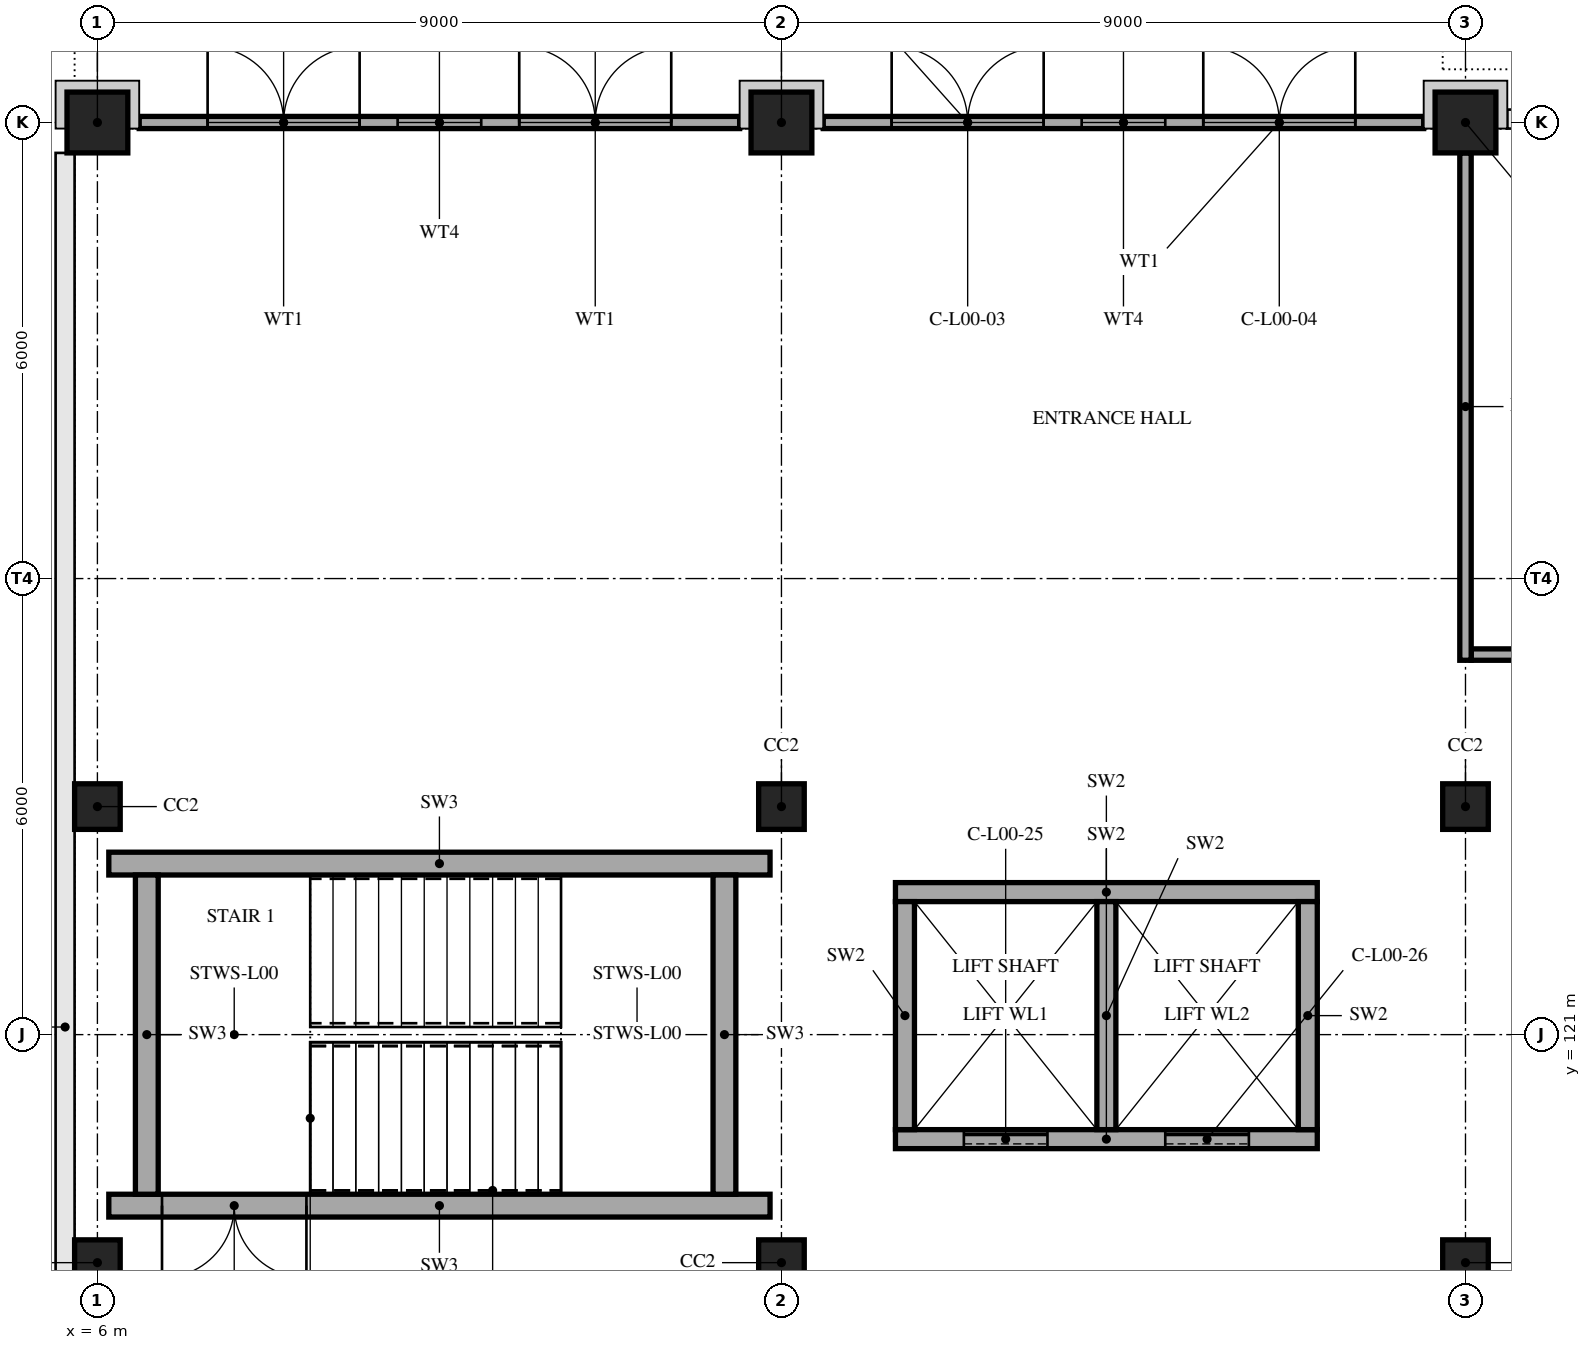
"""IFC4 building model, lengths in metres.
Left out: names, types, materials, properties, quantities, classifications, styles, units other than length and angle.
Written with IfcOpenShell. Run it as: python <this file> out.ifc"""

import sys

from ifc_helpers import new_model, si_unit, direction, frame, frame_2d, origin, origin_2d, place, context, subcontext, project, spatial, rectangle, extrude, element, fill, save


model = new_model("IFC4")
c1 = context("Model", 3, precision=1e-05, world=origin(), true_north=direction((0.0, 1.0)))
c2 = subcontext(c1, "Body", "Model", "MODEL_VIEW")
j1 = project(units=[si_unit("LENGTHUNIT", "METRE"), si_unit("PLANEANGLEUNIT", "RADIAN")], contexts=[c1])
p1 = place(None, origin())
s1 = spatial("IfcSite", under=j1, at=p1, CompositionType="ELEMENT")
p2 = place(p1, origin())
s2 = spatial("IfcBuilding", under=s1, at=p2, CompositionType="ELEMENT")
p3 = place(p2, origin())
s3 = spatial("IfcBuildingStorey", under=s2, at=p3, CompositionType="ELEMENT", Elevation=0.0)
for number, where, z_axis, x_axis in (
    (1, (6.0, 118.0, 0.0), (0.0, 0.0, 1.0), (1.0, 0.0, 0.0)),
    (2, (6.0, 124.0, 0.0), (0.0, 0.0, 1.0), (1.0, 0.0, 0.0)),
):
    element("IfcColumn", number, at=place(p3, frame(where, z_axis=z_axis, x_axis=x_axis)), inside=s3, PredefinedType="COLUMN", context=c2, shape_type="SweptSolid", body=[
        extrude(rectangle(XDim=0.6, YDim=0.6, at=origin_2d()), origin(), (0.0, 0.0, 1.0), 5.0),
    ])
p4 = place(p3, frame((6.0, 133.0, 0.0), z_axis=(0.0, 0.0, 1.0), x_axis=(1.0, 0.0, 0.0)))
e3 = element("IfcColumn", 3, at=p4, inside=s3, PredefinedType="COLUMN", context=c2, shape_type="SweptSolid", body=[
    extrude(rectangle(XDim=0.8, YDim=0.8, at=origin_2d()), origin(), (0.0, 0.0, 1.0), 5.0),
])
for number, where, z_axis, x_axis in (
    (4, (15.0, 118.0, 0.0), (0.0, 0.0, 1.0), (1.0, 0.0, 0.0)),
    (5, (15.0, 124.0, 0.0), (0.0, 0.0, 1.0), (1.0, 0.0, 0.0)),
):
    element("IfcColumn", number, at=place(p3, frame(where, z_axis=z_axis, x_axis=x_axis)), inside=s3, PredefinedType="COLUMN", context=c2, shape_type="SweptSolid", body=[
        extrude(rectangle(XDim=0.6, YDim=0.6, at=origin_2d()), origin(), (0.0, 0.0, 1.0), 5.0),
    ])
p5 = place(p3, frame((15.0, 133.0, 0.0), z_axis=(0.0, 0.0, 1.0), x_axis=(1.0, 0.0, 0.0)))
e6 = element("IfcColumn", 6, at=p5, inside=s3, PredefinedType="COLUMN", context=c2, shape_type="SweptSolid", body=[
    extrude(rectangle(XDim=0.8, YDim=0.8, at=origin_2d()), origin(), (0.0, 0.0, 1.0), 5.0),
])
for number, where, z_axis, x_axis in (
    (7, (24.0, 118.0, 0.0), (0.0, 0.0, 1.0), (1.0, 0.0, 0.0)),
    (8, (24.0, 124.0, 0.0), (0.0, 0.0, 1.0), (1.0, 0.0, 0.0)),
):
    element("IfcColumn", number, at=place(p3, frame(where, z_axis=z_axis, x_axis=x_axis)), inside=s3, PredefinedType="COLUMN", context=c2, shape_type="SweptSolid", body=[
        extrude(rectangle(XDim=0.6, YDim=0.6, at=origin_2d()), origin(), (0.0, 0.0, 1.0), 5.0),
    ])
p6 = place(p3, frame((24.0, 133.0, 0.0), z_axis=(0.0, 0.0, 1.0), x_axis=(1.0, 0.0, 0.0)))
e9 = element("IfcColumn", 9, at=p6, inside=s3, PredefinedType="COLUMN", context=c2, shape_type="SweptSolid", body=[
    extrude(rectangle(XDim=0.8, YDim=0.8, at=origin_2d()), origin(), (0.0, 0.0, 1.0), 5.0),
])
p7 = place(p3, frame((6.15, 118.75, 0.0), z_axis=(0.0, 0.0, 1.0), x_axis=(1.0, 0.0, 0.0)))
e10 = element("IfcWall", 10, at=p7, inside=s3, PredefinedType="SHEAR", context=c2, shape_type="SweptSolid", body=[
    extrude(rectangle(XDim=8.7, YDim=0.3, at=frame_2d((4.35, 0.0))), origin(), (0.0, 0.0, 1.0), 5.0),
])
p8 = place(p7, frame((0.7, 0.0, 0.0)))
e11 = element("IfcOpeningElement", 11, at=p8, cuts=e10, PredefinedType="OPENING", context=c2, shape_type="SweptSolid", body=[
    extrude(rectangle(XDim=1.9, YDim=2.1, at=frame_2d((0.95, 1.05))), frame((0.0, 0.16, 0.0), z_axis=(0.0, -1.0, 0.0), x_axis=(1.0, 0.0, 0.0)), (0.0, 0.0, 1.0), 0.32),
])
p9 = place(p3, frame((6.15, 123.25, 0.0), z_axis=(0.0, 0.0, 1.0), x_axis=(1.0, 0.0, 0.0)))
e12 = element("IfcWall", 12, at=p9, inside=s3, PredefinedType="SHEAR", context=c2, shape_type="SweptSolid", body=[
    extrude(rectangle(XDim=8.7, YDim=0.3, at=frame_2d((4.35, 0.0))), origin(), (0.0, 0.0, 1.0), 5.0),
])
for number, where, z_axis, x_axis in (
    (13, (6.65, 118.9, 0.0), (0.0, 0.0, 1.0), (0.0, 1.0, 0.0)),
    (14, (14.25, 118.9, 0.0), (0.0, 0.0, 1.0), (0.0, 1.0, 0.0)),
):
    element("IfcWall", number, at=place(p3, frame(where, z_axis=z_axis, x_axis=x_axis)), inside=s3, PredefinedType="SHEAR", context=c2, shape_type="SweptSolid", body=[
        extrude(rectangle(XDim=4.2, YDim=0.3, at=frame_2d((2.1, 0.0))), origin(), (0.0, 0.0, 1.0), 5.0),
    ])
p10 = place(p3, frame((16.5, 119.625, 0.0), z_axis=(0.0, 0.0, 1.0), x_axis=(1.0, 0.0, 0.0)))
e15 = element("IfcWall", 15, at=p10, inside=s3, PredefinedType="SHEAR", context=c2, shape_type="SweptSolid", body=[
    extrude(rectangle(XDim=5.55, YDim=0.25, at=frame_2d((2.775, 0.0))), origin(), (0.0, 0.0, 1.0), 5.0),
])
p11 = place(p10, frame((0.9, 0.0, 0.0)))
e16 = element("IfcOpeningElement", 16, at=p11, cuts=e15, PredefinedType="OPENING", context=c2, shape_type="SweptSolid", body=[
    extrude(rectangle(XDim=1.1, YDim=2.1, at=frame_2d((0.55, 1.05))), frame((0.0, 0.135, 0.0), z_axis=(0.0, -1.0, 0.0), x_axis=(1.0, 0.0, 0.0)), (0.0, 0.0, 1.0), 0.27),
])
p12 = place(p10, frame((3.55, 0.0, 0.0)))
e17 = element("IfcOpeningElement", 17, at=p12, cuts=e15, PredefinedType="OPENING", context=c2, shape_type="SweptSolid", body=[
    extrude(rectangle(XDim=1.1, YDim=2.1, at=frame_2d((0.55, 1.05))), frame((0.0, 0.135, 0.0), z_axis=(0.0, -1.0, 0.0), x_axis=(1.0, 0.0, 0.0)), (0.0, 0.0, 1.0), 0.27),
])
p13 = place(p3, frame((16.5, 122.875, 0.0), z_axis=(0.0, 0.0, 1.0), x_axis=(1.0, 0.0, 0.0)))
e18 = element("IfcWall", 18, at=p13, inside=s3, PredefinedType="SHEAR", context=c2, shape_type="SweptSolid", body=[
    extrude(rectangle(XDim=5.55, YDim=0.25, at=frame_2d((2.775, 0.0))), origin(), (0.0, 0.0, 1.0), 5.0),
])
for number, where, z_axis, x_axis in (
    (19, (16.625, 119.75, 0.0), (0.0, 0.0, 1.0), (0.0, 1.0, 0.0)),
    (20, (21.925, 119.75, 0.0), (0.0, 0.0, 1.0), (0.0, 1.0, 0.0)),
    (21, (19.275, 119.75, 0.0), (0.0, 0.0, 1.0), (0.0, 1.0, 0.0)),
):
    element("IfcWall", number, at=place(p3, frame(where, z_axis=z_axis, x_axis=x_axis)), inside=s3, PredefinedType="SHEAR", context=c2, shape_type="SweptSolid", body=[
        extrude(rectangle(XDim=3.0, YDim=0.25, at=frame_2d((1.5, 0.0))), origin(), (0.0, 0.0, 1.0), 5.0),
    ])
p14 = place(p3, frame((6.55, 133.0, 0.0), z_axis=(0.0, 0.0, 1.0), x_axis=(1.0, 0.0, 0.0)))
e22 = element("IfcWall", 22, at=p14, inside=s3, PredefinedType="STANDARD", context=c2, shape_type="SweptSolid", body=[
    extrude(rectangle(XDim=7.9, YDim=0.16, at=frame_2d((3.95, 0.0))), origin(), (0.0, 0.0, 1.0), 5.0),
])
p15 = place(p14, frame((0.9, 0.0, 0.0)))
e23 = element("IfcOpeningElement", 23, at=p15, cuts=e22, PredefinedType="OPENING", context=c2, shape_type="SweptSolid", body=[
    extrude(rectangle(XDim=2.0, YDim=2.4, at=frame_2d((1.0, 1.2))), frame((0.0, 0.09, 0.0), z_axis=(0.0, -1.0, 0.0), x_axis=(1.0, 0.0, 0.0)), (0.0, 0.0, 1.0), 0.18),
])
p16 = place(p14, frame((0.9, 0.0, 2.6)))
e24 = element("IfcOpeningElement", 24, at=p16, cuts=e22, PredefinedType="OPENING", context=c2, shape_type="SweptSolid", body=[
    extrude(rectangle(XDim=2.0, YDim=2.1, at=frame_2d((1.0, 1.05))), frame((0.0, 0.09, 0.0), z_axis=(0.0, -1.0, 0.0), x_axis=(1.0, 0.0, 0.0)), (0.0, 0.0, 1.0), 0.18),
])
p17 = place(p14, frame((5.0, 0.0, 0.0)))
e25 = element("IfcOpeningElement", 25, at=p17, cuts=e22, PredefinedType="OPENING", context=c2, shape_type="SweptSolid", body=[
    extrude(rectangle(XDim=2.0, YDim=2.4, at=frame_2d((1.0, 1.2))), frame((0.0, 0.09, 0.0), z_axis=(0.0, -1.0, 0.0), x_axis=(1.0, 0.0, 0.0)), (0.0, 0.0, 1.0), 0.18),
])
p18 = place(p14, frame((5.0, 0.0, 2.6)))
e26 = element("IfcOpeningElement", 26, at=p18, cuts=e22, PredefinedType="OPENING", context=c2, shape_type="SweptSolid", body=[
    extrude(rectangle(XDim=2.0, YDim=2.1, at=frame_2d((1.0, 1.05))), frame((0.0, 0.09, 0.0), z_axis=(0.0, -1.0, 0.0), x_axis=(1.0, 0.0, 0.0)), (0.0, 0.0, 1.0), 0.18),
])
p19 = place(p14, frame((3.4, 0.0, 0.9)))
e27 = element("IfcOpeningElement", 27, at=p19, cuts=e22, PredefinedType="OPENING", context=c2, shape_type="SweptSolid", body=[
    extrude(rectangle(XDim=1.1, YDim=3.8, at=frame_2d((0.55, 1.9))), frame((0.0, 0.09, 0.0), z_axis=(0.0, -1.0, 0.0), x_axis=(1.0, 0.0, 0.0)), (0.0, 0.0, 1.0), 0.18),
])
p20 = place(p3, frame((15.55, 133.0, 0.0), z_axis=(0.0, 0.0, 1.0), x_axis=(1.0, 0.0, 0.0)))
e28 = element("IfcWall", 28, at=p20, inside=s3, PredefinedType="STANDARD", context=c2, shape_type="SweptSolid", body=[
    extrude(rectangle(XDim=7.9, YDim=0.16, at=frame_2d((3.95, 0.0))), origin(), (0.0, 0.0, 1.0), 5.0),
])
p21 = place(p20, frame((0.9, 0.0, 0.0)))
e29 = element("IfcOpeningElement", 29, at=p21, cuts=e28, PredefinedType="OPENING", context=c2, shape_type="SweptSolid", body=[
    extrude(rectangle(XDim=2.0, YDim=2.4, at=frame_2d((1.0, 1.2))), frame((0.0, 0.09, 0.0), z_axis=(0.0, -1.0, 0.0), x_axis=(1.0, 0.0, 0.0)), (0.0, 0.0, 1.0), 0.18),
])
p22 = place(p20, frame((0.9, 0.0, 2.6)))
e30 = element("IfcOpeningElement", 30, at=p22, cuts=e28, PredefinedType="OPENING", context=c2, shape_type="SweptSolid", body=[
    extrude(rectangle(XDim=2.0, YDim=2.1, at=frame_2d((1.0, 1.05))), frame((0.0, 0.09, 0.0), z_axis=(0.0, -1.0, 0.0), x_axis=(1.0, 0.0, 0.0)), (0.0, 0.0, 1.0), 0.18),
])
p23 = place(p20, frame((5.0, 0.0, 0.0)))
e31 = element("IfcOpeningElement", 31, at=p23, cuts=e28, PredefinedType="OPENING", context=c2, shape_type="SweptSolid", body=[
    extrude(rectangle(XDim=2.0, YDim=2.4, at=frame_2d((1.0, 1.2))), frame((0.0, 0.09, 0.0), z_axis=(0.0, -1.0, 0.0), x_axis=(1.0, 0.0, 0.0)), (0.0, 0.0, 1.0), 0.18),
])
p24 = place(p20, frame((5.0, 0.0, 2.6)))
e32 = element("IfcOpeningElement", 32, at=p24, cuts=e28, PredefinedType="OPENING", context=c2, shape_type="SweptSolid", body=[
    extrude(rectangle(XDim=2.0, YDim=2.1, at=frame_2d((1.0, 1.05))), frame((0.0, 0.09, 0.0), z_axis=(0.0, -1.0, 0.0), x_axis=(1.0, 0.0, 0.0)), (0.0, 0.0, 1.0), 0.18),
])
p25 = place(p20, frame((3.4, 0.0, 0.9)))
e33 = element("IfcOpeningElement", 33, at=p25, cuts=e28, PredefinedType="OPENING", context=c2, shape_type="SweptSolid", body=[
    extrude(rectangle(XDim=1.1, YDim=3.8, at=frame_2d((0.55, 1.9))), frame((0.0, 0.09, 0.0), z_axis=(0.0, -1.0, 0.0), x_axis=(1.0, 0.0, 0.0)), (0.0, 0.0, 1.0), 0.18),
])
p26 = place(p3, frame((24.075, 126.0, 0.0), z_axis=(0.0, 0.0, 1.0), x_axis=(1.0, 0.0, 0.0)))
e34 = element("IfcWall", 34, at=p26, inside=s3, PredefinedType="PARTITIONING", context=c2, shape_type="SweptSolid", body=[
    extrude(rectangle(XDim=8.85, YDim=0.15, at=frame_2d((4.425, 0.0))), origin(), (0.0, 0.0, 1.0), 4.8),
])
p27 = place(p26, frame((0.6, 0.0, 0.0)))
e35 = element("IfcOpeningElement", 35, at=p27, cuts=e34, PredefinedType="OPENING", context=c2, shape_type="SweptSolid", body=[
    extrude(rectangle(XDim=1.0, YDim=2.1, at=frame_2d((0.5, 1.05))), frame((0.0, 0.085, 0.0), z_axis=(0.0, -1.0, 0.0), x_axis=(1.0, 0.0, 0.0)), (0.0, 0.0, 1.0), 0.17),
])
p28 = place(p3, frame((24.0, 125.925, 0.0), z_axis=(0.0, 0.0, 1.0), x_axis=(0.0, 1.0, 0.0)))
e36 = element("IfcWall", 36, at=p28, inside=s3, PredefinedType="PARTITIONING", context=c2, shape_type="SweptSolid", body=[
    extrude(rectangle(XDim=6.675, YDim=0.15, at=frame_2d((3.337, 0.0))), origin(), (0.0, 0.0, 1.0), 4.0),
])
p29 = place(p15, origin())
e37 = element("IfcDoor", 37, at=p29, inside=s3, OperationType="DOUBLE_DOOR_SINGLE_SWING", PredefinedType="NOTDEFINED", context=c2, shape_type="SweptSolid", body=[
    extrude(rectangle(XDim=2.0, YDim=2.4, at=frame_2d((1.0, 1.2))), frame((0.0, 0.025, 0.0), z_axis=(0.0, -1.0, 0.0), x_axis=(1.0, 0.0, 0.0)), (0.0, 0.0, 1.0), 0.05),
])
fill(e23, e37)
p30 = place(p16, origin())
e38 = element("IfcWindow", 38, at=p30, inside=s3, PartitioningType="SINGLE_PANEL", PredefinedType="WINDOW", context=c2, shape_type="SweptSolid", body=[
    extrude(rectangle(XDim=2.0, YDim=2.1, at=frame_2d((1.0, 1.05))), frame((0.0, 0.03, 0.0), z_axis=(0.0, -1.0, 0.0), x_axis=(1.0, 0.0, 0.0)), (0.0, 0.0, 1.0), 0.06),
])
fill(e24, e38)
p31 = place(p17, origin())
e39 = element("IfcDoor", 39, at=p31, inside=s3, OperationType="DOUBLE_DOOR_SINGLE_SWING", PredefinedType="NOTDEFINED", context=c2, shape_type="SweptSolid", body=[
    extrude(rectangle(XDim=2.0, YDim=2.4, at=frame_2d((1.0, 1.2))), frame((0.0, 0.025, 0.0), z_axis=(0.0, -1.0, 0.0), x_axis=(1.0, 0.0, 0.0)), (0.0, 0.0, 1.0), 0.05),
])
fill(e25, e39)
p32 = place(p18, origin())
e40 = element("IfcWindow", 40, at=p32, inside=s3, PartitioningType="SINGLE_PANEL", PredefinedType="WINDOW", context=c2, shape_type="SweptSolid", body=[
    extrude(rectangle(XDim=2.0, YDim=2.1, at=frame_2d((1.0, 1.05))), frame((0.0, 0.03, 0.0), z_axis=(0.0, -1.0, 0.0), x_axis=(1.0, 0.0, 0.0)), (0.0, 0.0, 1.0), 0.06),
])
fill(e26, e40)
p33 = place(p19, origin())
e41 = element("IfcWindow", 41, at=p33, inside=s3, PartitioningType="SINGLE_PANEL", PredefinedType="WINDOW", context=c2, shape_type="SweptSolid", body=[
    extrude(rectangle(XDim=1.1, YDim=3.8, at=frame_2d((0.55, 1.9))), frame((0.0, 0.03, 0.0), z_axis=(0.0, -1.0, 0.0), x_axis=(1.0, 0.0, 0.0)), (0.0, 0.0, 1.0), 0.06),
])
fill(e27, e41)
p34 = place(p21, origin())
e42 = element("IfcDoor", 42, at=p34, inside=s3, OperationType="DOUBLE_DOOR_SINGLE_SWING", PredefinedType="NOTDEFINED", context=c2, shape_type="SweptSolid", body=[
    extrude(rectangle(XDim=2.0, YDim=2.4, at=frame_2d((1.0, 1.2))), frame((0.0, 0.025, 0.0), z_axis=(0.0, -1.0, 0.0), x_axis=(1.0, 0.0, 0.0)), (0.0, 0.0, 1.0), 0.05),
])
fill(e29, e42)
p35 = place(p22, origin())
e43 = element("IfcWindow", 43, at=p35, inside=s3, PartitioningType="SINGLE_PANEL", PredefinedType="WINDOW", context=c2, shape_type="SweptSolid", body=[
    extrude(rectangle(XDim=2.0, YDim=2.1, at=frame_2d((1.0, 1.05))), frame((0.0, 0.03, 0.0), z_axis=(0.0, -1.0, 0.0), x_axis=(1.0, 0.0, 0.0)), (0.0, 0.0, 1.0), 0.06),
])
fill(e30, e43)
p36 = place(p23, origin())
e44 = element("IfcDoor", 44, at=p36, inside=s3, OperationType="DOUBLE_DOOR_SINGLE_SWING", PredefinedType="NOTDEFINED", context=c2, shape_type="SweptSolid", body=[
    extrude(rectangle(XDim=2.0, YDim=2.4, at=frame_2d((1.0, 1.2))), frame((0.0, 0.025, 0.0), z_axis=(0.0, -1.0, 0.0), x_axis=(1.0, 0.0, 0.0)), (0.0, 0.0, 1.0), 0.05),
])
fill(e31, e44)
p37 = place(p24, origin())
e45 = element("IfcWindow", 45, at=p37, inside=s3, PartitioningType="SINGLE_PANEL", PredefinedType="WINDOW", context=c2, shape_type="SweptSolid", body=[
    extrude(rectangle(XDim=2.0, YDim=2.1, at=frame_2d((1.0, 1.05))), frame((0.0, 0.03, 0.0), z_axis=(0.0, -1.0, 0.0), x_axis=(1.0, 0.0, 0.0)), (0.0, 0.0, 1.0), 0.06),
])
fill(e32, e45)
p38 = place(p25, origin())
e46 = element("IfcWindow", 46, at=p38, inside=s3, PartitioningType="SINGLE_PANEL", PredefinedType="WINDOW", context=c2, shape_type="SweptSolid", body=[
    extrude(rectangle(XDim=1.1, YDim=3.8, at=frame_2d((0.55, 1.9))), frame((0.0, 0.03, 0.0), z_axis=(0.0, -1.0, 0.0), x_axis=(1.0, 0.0, 0.0)), (0.0, 0.0, 1.0), 0.06),
])
fill(e33, e46)
p39 = place(p8, frame((1.9, 0.0, 0.0), z_axis=(0.0, 0.0, 1.0), x_axis=(-1.0, 0.0, 0.0)))
e47 = element("IfcDoor", 47, at=p39, inside=s3, OperationType="DOUBLE_DOOR_SINGLE_SWING", PredefinedType="NOTDEFINED", context=c2, shape_type="SweptSolid", body=[
    extrude(rectangle(XDim=1.9, YDim=2.1, at=frame_2d((0.95, 1.05))), frame((0.0, 0.025, 0.0), z_axis=(0.0, -1.0, 0.0), x_axis=(1.0, 0.0, 0.0)), (0.0, 0.0, 1.0), 0.05),
])
fill(e11, e47)
p40 = place(p11, origin())
e48 = element("IfcDoor", 48, at=p40, inside=s3, OperationType="DOUBLE_DOOR_SLIDING", PredefinedType="NOTDEFINED", context=c2, shape_type="SweptSolid", body=[
    extrude(rectangle(XDim=1.1, YDim=2.1, at=frame_2d((0.55, 1.05))), frame((0.0, 0.025, 0.0), z_axis=(0.0, -1.0, 0.0), x_axis=(1.0, 0.0, 0.0)), (0.0, 0.0, 1.0), 0.05),
])
fill(e16, e48)
p41 = place(p12, origin())
e49 = element("IfcDoor", 49, at=p41, inside=s3, OperationType="DOUBLE_DOOR_SLIDING", PredefinedType="NOTDEFINED", context=c2, shape_type="SweptSolid", body=[
    extrude(rectangle(XDim=1.1, YDim=2.1, at=frame_2d((0.55, 1.05))), frame((0.0, 0.025, 0.0), z_axis=(0.0, -1.0, 0.0), x_axis=(1.0, 0.0, 0.0)), (0.0, 0.0, 1.0), 0.05),
])
fill(e17, e49)
save(model, sys.argv[1])
